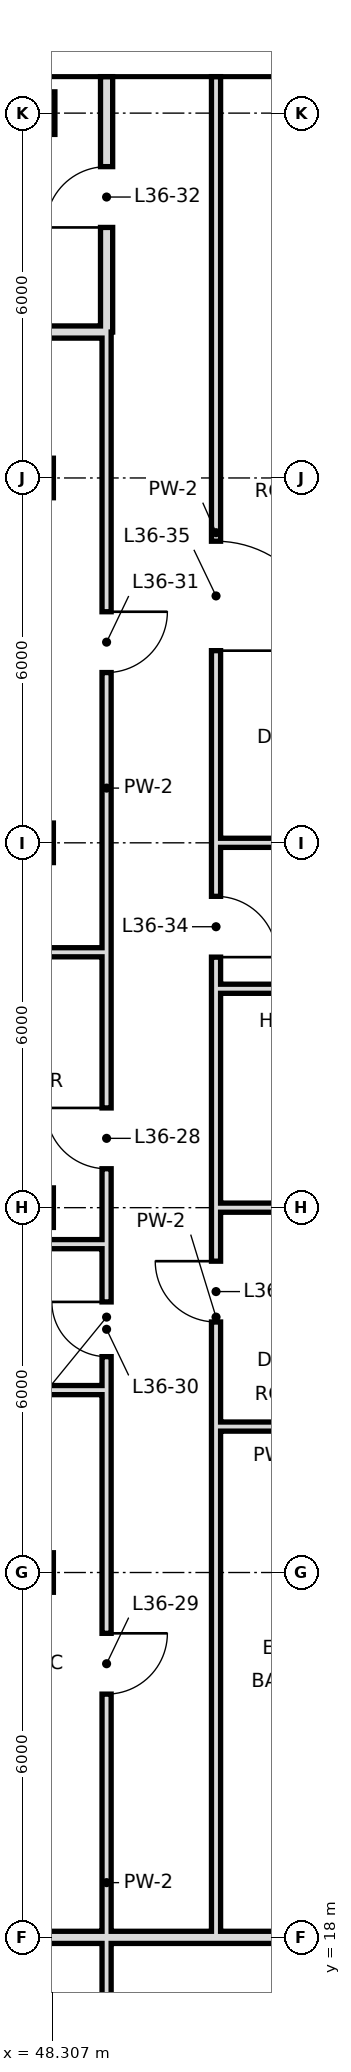
"""IFC4 building model, lengths in metres.
Left out: names, types, materials, properties, quantities, classifications, styles, units other than length and angle.
Written with IfcOpenShell. Run it as: python <this file> out.ifc"""

import sys

from ifc_helpers import new_model, si_unit, direction, frame, frame_2d, origin, origin_2d, place, context, subcontext, project, spatial, rectangle, hollow_rectangle, extrude, element, fill, save


model = new_model("IFC4")
c1 = context("Model", 3, precision=1e-05, world=origin(), true_north=direction((0.0, 1.0)))
c2 = subcontext(c1, "Body", "Model", "MODEL_VIEW")
j1 = project(units=[si_unit("LENGTHUNIT", "METRE"), si_unit("PLANEANGLEUNIT", "RADIAN")], contexts=[c1])
p1 = place(None, origin())
s1 = spatial("IfcSite", under=j1, at=p1, CompositionType="ELEMENT")
p2 = place(p1, origin())
s2 = spatial("IfcBuilding", under=s1, at=p2, CompositionType="ELEMENT")
p3 = place(p2, frame((0.0, 0.0, 158.2)))
s3 = spatial("IfcBuildingStorey", under=s2, at=p3, CompositionType="ELEMENT", Elevation=158.2)
for number, where, z_axis, x_axis in (
    (1, (48.0, 24.0, 0.0), (0.0, 0.0, 1.0), (1.0, 0.0, 0.0)),
    (2, (48.0, 30.0, 0.0), (0.0, 0.0, 1.0), (1.0, 0.0, 0.0)),
    (3, (48.0, 36.0, 0.0), (0.0, 0.0, 1.0), (1.0, 0.0, 0.0)),
    (4, (48.0, 42.0, 0.0), (0.0, 0.0, 1.0), (1.0, 0.0, 0.0)),
):
    element("IfcColumn", number, at=place(p3, frame(where, z_axis=z_axis, x_axis=x_axis)), inside=s3, PredefinedType="COLUMN", context=c2, shape_type="SweptSolid", body=[
        extrude(hollow_rectangle(XDim=0.65, YDim=0.65, WallThickness=0.032, at=origin_2d()), origin(), (0.0, 0.0, 1.0), 3.6),
    ])
p4 = place(p3, frame((48.0, 48.0, 0.0), z_axis=(0.0, 0.0, 1.0), x_axis=(1.0, 0.0, 0.0)))
e5 = element("IfcColumn", 5, at=p4, inside=s3, PredefinedType="COLUMN", context=c2, shape_type="SweptSolid", body=[
    extrude(hollow_rectangle(XDim=0.7, YDim=0.7, WallThickness=0.036, at=origin_2d()), origin(), (0.0, 0.0, 1.0), 3.6),
])
p5 = place(p3, frame((49.2, 44.4, 0.0), z_axis=(0.0, 0.0, 1.0), x_axis=(0.0, 1.0, 0.0)))
e6 = element("IfcWall", 6, at=p5, inside=s3, PredefinedType="SOLIDWALL", context=c2, shape_type="SweptSolid", body=[
    extrude(rectangle(XDim=4.2, YDim=0.2, at=frame_2d((2.1, 0.0))), origin(), (0.0, 0.0, 1.0), 2.93),
])
p6 = place(p5, frame((1.72, 0.0, 0.0)))
e7 = element("IfcOpeningElement", 7, at=p6, cuts=e6, PredefinedType="OPENING", context=c2, shape_type="SweptSolid", body=[
    extrude(rectangle(XDim=1.0, YDim=2.4, at=frame_2d((0.5, 1.2))), frame((0.0, 0.11, 0.0), z_axis=(0.0, -1.0, 0.0), x_axis=(1.0, 0.0, 0.0)), (0.0, 0.0, 1.0), 0.22),
])
p7 = place(p3, frame((49.2, 10.8, 0.0), z_axis=(0.0, 0.0, 1.0), x_axis=(0.0, 1.0, 0.0)))
e8 = element("IfcWall", 8, at=p7, inside=s3, PredefinedType="PARTITIONING", context=c2, shape_type="SweptSolid", body=[
    extrude(rectangle(XDim=16.2, YDim=0.15, at=frame_2d((8.1, 0.0))), origin(), (0.0, 0.0, 1.0), 3.38),
])
p8 = place(p7, frame((11.2, 0.0, 0.0)))
e9 = element("IfcOpeningElement", 9, at=p8, cuts=e8, PredefinedType="OPENING", context=c2, shape_type="SweptSolid", body=[
    extrude(rectangle(XDim=1.0, YDim=2.4, at=frame_2d((0.5, 1.2))), frame((0.0, 0.085, 0.0), z_axis=(0.0, -1.0, 0.0), x_axis=(1.0, 0.0, 0.0)), (0.0, 0.0, 1.0), 0.17),
])
p9 = place(p3, frame((49.2, 29.4, 0.0), z_axis=(0.0, 0.0, 1.0), x_axis=(0.0, 1.0, 0.0)))
e10 = element("IfcWall", 10, at=p9, inside=s3, PredefinedType="PARTITIONING", context=c2, shape_type="SweptSolid", body=[
    extrude(rectangle(XDim=15.0, YDim=0.15, at=frame_2d((7.5, 0.0))), origin(), (0.0, 0.0, 1.0), 3.38),
])
p10 = place(p9, frame((1.24, 0.0, 0.0)))
e11 = element("IfcOpeningElement", 11, at=p10, cuts=e10, PredefinedType="OPENING", context=c2, shape_type="SweptSolid", body=[
    extrude(rectangle(XDim=1.0, YDim=2.4, at=frame_2d((0.5, 1.2))), frame((0.0, 0.085, 0.0), z_axis=(0.0, -1.0, 0.0), x_axis=(1.0, 0.0, 0.0)), (0.0, 0.0, 1.0), 0.17),
])
p11 = place(p9, frame((9.4, 0.0, 0.0)))
e12 = element("IfcOpeningElement", 12, at=p11, cuts=e10, PredefinedType="OPENING", context=c2, shape_type="SweptSolid", body=[
    extrude(rectangle(XDim=1.0, YDim=2.4, at=frame_2d((0.5, 1.2))), frame((0.0, 0.085, 0.0), z_axis=(0.0, -1.0, 0.0), x_axis=(1.0, 0.0, 0.0)), (0.0, 0.0, 1.0), 0.17),
])
p12 = place(p3, frame((49.2, 27.0, 0.0), z_axis=(0.0, 0.0, 1.0), x_axis=(0.0, 1.0, 0.0)))
e13 = element("IfcWall", 13, at=p12, inside=s3, PredefinedType="PARTITIONING", context=c2, shape_type="SweptSolid", body=[
    extrude(rectangle(XDim=2.4, YDim=0.15, at=frame_2d((1.2, 0.0))), origin(), (0.0, 0.0, 1.0), 3.38),
])
p13 = place(p12, frame((0.55, 0.0, 0.0)))
e14 = element("IfcOpeningElement", 14, at=p13, cuts=e13, PredefinedType="OPENING", context=c2, shape_type="SweptSolid", body=[
    extrude(rectangle(XDim=0.9, YDim=2.4, at=frame_2d((0.45, 1.2))), frame((0.0, 0.085, 0.0), z_axis=(0.0, -1.0, 0.0), x_axis=(1.0, 0.0, 0.0)), (0.0, 0.0, 1.0), 0.17),
])
p14 = place(p3, frame((51.0, 26.4, 0.0), z_axis=(0.0, 0.0, 1.0), x_axis=(0.0, 1.0, 0.0)))
e15 = element("IfcWall", 15, at=p14, inside=s3, PredefinedType="PARTITIONING", context=c2, shape_type="SweptSolid", body=[
    extrude(rectangle(XDim=3.6, YDim=0.15, at=frame_2d((1.8, 0.0))), origin(), (0.0, 0.0, 1.0), 3.38),
])
p15 = place(p14, frame((1.72, 0.0, 0.0)))
e16 = element("IfcOpeningElement", 16, at=p15, cuts=e15, PredefinedType="OPENING", context=c2, shape_type="SweptSolid", body=[
    extrude(rectangle(XDim=1.0, YDim=2.4, at=frame_2d((0.5, 1.2))), frame((0.0, 0.085, 0.0), z_axis=(0.0, -1.0, 0.0), x_axis=(1.0, 0.0, 0.0)), (0.0, 0.0, 1.0), 0.17),
])
p16 = place(p3, frame((51.0, 33.6, 0.0), z_axis=(0.0, 0.0, 1.0), x_axis=(0.0, 1.0, 0.0)))
e17 = element("IfcWall", 17, at=p16, inside=s3, PredefinedType="PARTITIONING", context=c2, shape_type="SweptSolid", body=[
    extrude(rectangle(XDim=15.0, YDim=0.15, at=frame_2d((7.5, 0.0))), origin(), (0.0, 0.0, 1.0), 3.38),
])
p17 = place(p16, frame((0.52, 0.0, 0.0)))
e18 = element("IfcOpeningElement", 18, at=p17, cuts=e17, PredefinedType="OPENING", context=c2, shape_type="SweptSolid", body=[
    extrude(rectangle(XDim=1.0, YDim=2.4, at=frame_2d((0.5, 1.2))), frame((0.0, 0.085, 0.0), z_axis=(0.0, -1.0, 0.0), x_axis=(1.0, 0.0, 0.0)), (0.0, 0.0, 1.0), 0.17),
])
p18 = place(p16, frame((5.56, 0.0, 0.0)))
e19 = element("IfcOpeningElement", 19, at=p18, cuts=e17, PredefinedType="OPENING", context=c2, shape_type="SweptSolid", body=[
    extrude(rectangle(XDim=1.8, YDim=2.4, at=frame_2d((0.9, 1.2))), frame((0.0, 0.085, 0.0), z_axis=(0.0, -1.0, 0.0), x_axis=(1.0, 0.0, 0.0)), (0.0, 0.0, 1.0), 0.17),
])
p19 = place(p3, frame((51.0, 18.0, 0.0), z_axis=(0.0, 0.0, 1.0), x_axis=(0.0, 1.0, 0.0)))
e20 = element("IfcWall", 20, at=p19, inside=s3, PredefinedType="PARTITIONING", context=c2, shape_type="SweptSolid", body=[
    extrude(rectangle(XDim=8.4, YDim=0.15, at=frame_2d((4.2, 0.0))), origin(), (0.0, 0.0, 1.0), 3.38),
])
p20 = place(p3, frame((51.0, 30.0, 0.0), z_axis=(0.0, 0.0, 1.0), x_axis=(0.0, 1.0, 0.0)))
e21 = element("IfcWall", 21, at=p20, inside=s3, PredefinedType="PARTITIONING", context=c2, shape_type="SweptSolid", body=[
    extrude(rectangle(XDim=3.6, YDim=0.15, at=frame_2d((1.8, 0.0))), origin(), (0.0, 0.0, 1.0), 3.38),
])
p21 = place(p3, frame((44.9, 18.0, 0.0), z_axis=(0.0, 0.0, 1.0), x_axis=(1.0, 0.0, 0.0)))
e22 = element("IfcWall", 22, at=p21, inside=s3, PredefinedType="SOLIDWALL", context=c2, shape_type="SweptSolid", body=[
    extrude(rectangle(XDim=15.7, YDim=0.2, at=frame_2d((7.85, 0.0))), origin(), (0.0, 0.0, 1.0), 2.68),
])
p22 = place(p3, frame((51.0, 26.4, 0.0), z_axis=(0.0, 0.0, 1.0), x_axis=(1.0, 0.0, 0.0)))
e23 = element("IfcWall", 23, at=p22, inside=s3, PredefinedType="PARTITIONING", context=c2, shape_type="SweptSolid", body=[
    extrude(rectangle(XDim=3.0, YDim=0.15, at=frame_2d((1.5, 0.0))), origin(), (0.0, 0.0, 1.0), 3.38),
])
for number, where, z_axis, x_axis in (
    (24, (44.9, 27.0, 0.0), (0.0, 0.0, 1.0), (1.0, 0.0, 0.0)),
    (25, (44.9, 29.4, 0.0), (0.0, 0.0, 1.0), (1.0, 0.0, 0.0)),
):
    element("IfcWall", number, at=place(p3, frame(where, z_axis=z_axis, x_axis=x_axis)), inside=s3, PredefinedType="PARTITIONING", context=c2, shape_type="SweptSolid", body=[
        extrude(rectangle(XDim=4.3, YDim=0.15, at=frame_2d((2.15, 0.0))), origin(), (0.0, 0.0, 1.0), 3.38),
    ])
p23 = place(p3, frame((51.0, 30.0, 0.0), z_axis=(0.0, 0.0, 1.0), x_axis=(1.0, 0.0, 0.0)))
e26 = element("IfcWall", 26, at=p23, inside=s3, PredefinedType="PARTITIONING", context=c2, shape_type="SweptSolid", body=[
    extrude(rectangle(XDim=3.0, YDim=0.15, at=frame_2d((1.5, 0.0))), origin(), (0.0, 0.0, 1.0), 2.68),
])
p24 = place(p3, frame((51.0, 33.6, 0.0), z_axis=(0.0, 0.0, 1.0), x_axis=(1.0, 0.0, 0.0)))
e27 = element("IfcWall", 27, at=p24, inside=s3, PredefinedType="PARTITIONING", context=c2, shape_type="SweptSolid", body=[
    extrude(rectangle(XDim=3.0, YDim=0.15, at=frame_2d((1.5, 0.0))), origin(), (0.0, 0.0, 1.0), 3.38),
])
p25 = place(p3, frame((44.9, 34.2, 0.0), z_axis=(0.0, 0.0, 1.0), x_axis=(1.0, 0.0, 0.0)))
e28 = element("IfcWall", 28, at=p25, inside=s3, PredefinedType="PARTITIONING", context=c2, shape_type="SweptSolid", body=[
    extrude(rectangle(XDim=4.3, YDim=0.15, at=frame_2d((2.15, 0.0))), origin(), (0.0, 0.0, 1.0), 3.38),
])
p26 = place(p3, frame((51.0, 36.0, 0.0), z_axis=(0.0, 0.0, 1.0), x_axis=(1.0, 0.0, 0.0)))
e29 = element("IfcWall", 29, at=p26, inside=s3, PredefinedType="PARTITIONING", context=c2, shape_type="SweptSolid", body=[
    extrude(rectangle(XDim=9.0, YDim=0.15, at=frame_2d((4.5, 0.0))), origin(), (0.0, 0.0, 1.0), 2.68),
])
p27 = place(p3, frame((44.9, 44.4, 0.0), z_axis=(0.0, 0.0, 1.0), x_axis=(1.0, 0.0, 0.0)))
e30 = element("IfcWall", 30, at=p27, inside=s3, PredefinedType="SOLIDWALL", context=c2, shape_type="SweptSolid", body=[
    extrude(rectangle(XDim=4.3, YDim=0.2, at=frame_2d((2.15, 0.0))), origin(), (0.0, 0.0, 1.0), 2.93),
])
p28 = place(p10, frame((1.0, 0.0, 0.0), z_axis=(0.0, 0.0, 1.0), x_axis=(-1.0, 0.0, 0.0)))
e31 = element("IfcDoor", 31, at=p28, inside=s3, OperationType="SINGLE_SWING_LEFT", PredefinedType="DOOR", context=c2, shape_type="SweptSolid", body=[
    extrude(rectangle(XDim=1.0, YDim=2.4, at=frame_2d((0.5, 1.2))), frame((0.0, 0.025, 0.0), z_axis=(0.0, -1.0, 0.0), x_axis=(1.0, 0.0, 0.0)), (0.0, 0.0, 1.0), 0.05),
])
fill(e11, e31)
p29 = place(p8, origin())
e32 = element("IfcDoor", 32, at=p29, inside=s3, OperationType="SINGLE_SWING_RIGHT", PredefinedType="DOOR", context=c2, shape_type="SweptSolid", body=[
    extrude(rectangle(XDim=1.0, YDim=2.4, at=frame_2d((0.5, 1.2))), frame((0.0, 0.025, 0.0), z_axis=(0.0, -1.0, 0.0), x_axis=(1.0, 0.0, 0.0)), (0.0, 0.0, 1.0), 0.05),
])
fill(e9, e32)
p30 = place(p13, frame((0.9, 0.0, 0.0), z_axis=(0.0, 0.0, 1.0), x_axis=(-1.0, 0.0, 0.0)))
e33 = element("IfcDoor", 33, at=p30, inside=s3, OperationType="SINGLE_SWING_LEFT", PredefinedType="DOOR", context=c2, shape_type="SweptSolid", body=[
    extrude(rectangle(XDim=0.9, YDim=2.4, at=frame_2d((0.45, 1.2))), frame((0.0, 0.025, 0.0), z_axis=(0.0, -1.0, 0.0), x_axis=(1.0, 0.0, 0.0)), (0.0, 0.0, 1.0), 0.05),
])
fill(e14, e33)
p31 = place(p11, origin())
e34 = element("IfcDoor", 34, at=p31, inside=s3, OperationType="SINGLE_SWING_RIGHT", PredefinedType="DOOR", context=c2, shape_type="SweptSolid", body=[
    extrude(rectangle(XDim=1.0, YDim=2.4, at=frame_2d((0.5, 1.2))), frame((0.0, 0.025, 0.0), z_axis=(0.0, -1.0, 0.0), x_axis=(1.0, 0.0, 0.0)), (0.0, 0.0, 1.0), 0.05),
])
fill(e12, e34)
p32 = place(p6, origin())
e35 = element("IfcDoor", 35, at=p32, inside=s3, OperationType="SINGLE_SWING_LEFT", PredefinedType="DOOR", context=c2, shape_type="SweptSolid", body=[
    extrude(rectangle(XDim=1.0, YDim=2.4, at=frame_2d((0.5, 1.2))), frame((0.0, 0.025, 0.0), z_axis=(0.0, -1.0, 0.0), x_axis=(1.0, 0.0, 0.0)), (0.0, 0.0, 1.0), 0.05),
])
fill(e7, e35)
p33 = place(p15, frame((1.0, 0.0, 0.0), z_axis=(0.0, 0.0, 1.0), x_axis=(-1.0, 0.0, 0.0)))
e36 = element("IfcDoor", 36, at=p33, inside=s3, OperationType="SINGLE_SWING_LEFT", PredefinedType="DOOR", context=c2, shape_type="SweptSolid", body=[
    extrude(rectangle(XDim=1.0, YDim=2.4, at=frame_2d((0.5, 1.2))), frame((0.0, 0.025, 0.0), z_axis=(0.0, -1.0, 0.0), x_axis=(1.0, 0.0, 0.0)), (0.0, 0.0, 1.0), 0.05),
])
fill(e16, e36)
p34 = place(p17, frame((1.0, 0.0, 0.0), z_axis=(0.0, 0.0, 1.0), x_axis=(-1.0, 0.0, 0.0)))
e37 = element("IfcDoor", 37, at=p34, inside=s3, OperationType="SINGLE_SWING_RIGHT", PredefinedType="DOOR", context=c2, shape_type="SweptSolid", body=[
    extrude(rectangle(XDim=1.0, YDim=2.4, at=frame_2d((0.5, 1.2))), frame((0.0, 0.025, 0.0), z_axis=(0.0, -1.0, 0.0), x_axis=(1.0, 0.0, 0.0)), (0.0, 0.0, 1.0), 0.05),
])
fill(e18, e37)
p35 = place(p18, frame((1.8, 0.0, 0.0), z_axis=(0.0, 0.0, 1.0), x_axis=(-1.0, 0.0, 0.0)))
e38 = element("IfcDoor", 38, at=p35, inside=s3, OperationType="SINGLE_SWING_RIGHT", PredefinedType="DOOR", context=c2, shape_type="SweptSolid", body=[
    extrude(rectangle(XDim=1.8, YDim=2.4, at=frame_2d((0.9, 1.2))), frame((0.0, 0.025, 0.0), z_axis=(0.0, -1.0, 0.0), x_axis=(1.0, 0.0, 0.0)), (0.0, 0.0, 1.0), 0.05),
])
fill(e19, e38)
save(model, sys.argv[1])
